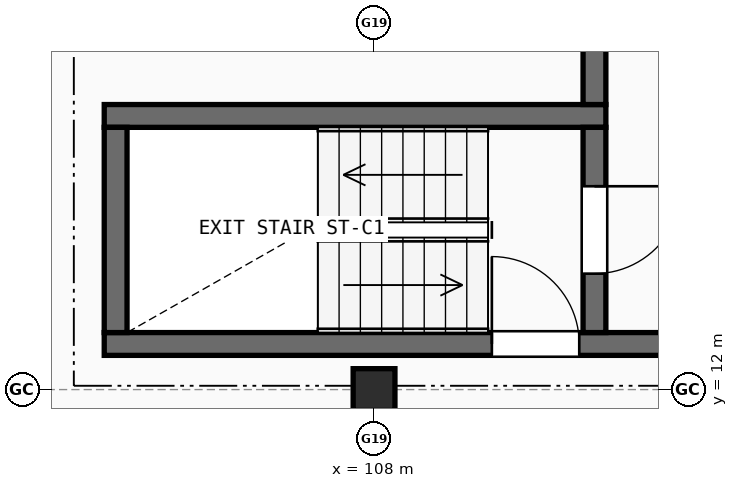
"""IFC4 building model, lengths in metres.
Left out: names, types, materials, properties, quantities, classifications, styles, units other than length and angle.
Written with IfcOpenShell. Run it as: python <this file> out.ifc"""

import sys

from ifc_helpers import new_model, si_unit, direction, frame, frame_2d, origin, origin_2d, place, context, subcontext, project, spatial, rectangle, extrude, element, fill, save


model = new_model("IFC4")
c1 = context("Model", 3, precision=1e-05, world=origin(), true_north=direction((0.0, 1.0)))
c2 = subcontext(c1, "Body", "Model", "MODEL_VIEW")
j1 = project(units=[si_unit("LENGTHUNIT", "METRE"), si_unit("PLANEANGLEUNIT", "RADIAN")], contexts=[c1])
p1 = place(None, origin())
s1 = spatial("IfcSite", under=j1, at=p1, CompositionType="ELEMENT")
p2 = place(p1, origin())
s2 = spatial("IfcBuilding", under=s1, at=p2, CompositionType="ELEMENT")
p3 = place(p2, frame((0.0, 0.0, 23.7)))
s3 = spatial("IfcBuildingStorey", under=s2, at=p3, CompositionType="ELEMENT", Elevation=23.7)
p4 = place(p3, frame((108.0, 12.0, 0.0), z_axis=(0.0, 0.0, 1.0), x_axis=(1.0, 0.0, 0.0)))
e1 = element("IfcColumn", 1, at=p4, inside=s3, PredefinedType="COLUMN", context=c2, shape_type="SweptSolid", body=[
    extrude(rectangle(XDim=0.55, YDim=0.55, at=origin_2d()), origin(), (0.0, 0.0, 1.0), 2.975),
])
p5 = place(p3, frame((104.45, 12.6, 0.0), z_axis=(0.0, 0.0, 1.0), x_axis=(1.0, 0.0, 0.0)))
e2 = element("IfcWall", 2, at=p5, inside=s3, PredefinedType="SHEAR", context=c2, shape_type="SweptSolid", body=[
    extrude(rectangle(XDim=11.35, YDim=0.3, at=frame_2d((5.675, 0.0))), origin(), (0.0, 0.0, 1.0), 2.975),
])
p6 = place(p5, frame((5.1, 0.0, 0.0)))
e3 = element("IfcOpeningElement", 3, at=p6, cuts=e2, PredefinedType="OPENING", context=c2, shape_type="SweptSolid", body=[
    extrude(rectangle(XDim=1.15, YDim=2.15, at=frame_2d((0.575, 1.075))), frame((0.0, 0.16, 0.0), z_axis=(0.0, -1.0, 0.0), x_axis=(1.0, 0.0, 0.0)), (0.0, 0.0, 1.0), 0.32),
])
p7 = place(p3, frame((111.05, 15.6, 0.0), z_axis=(0.0, 0.0, 1.0), x_axis=(-1.0, 0.0, 0.0)))
e4 = element("IfcWall", 4, at=p7, inside=s3, PredefinedType="SHEAR", context=c2, shape_type="SweptSolid", body=[
    extrude(rectangle(XDim=6.6, YDim=0.3, at=frame_2d((3.3, 0.0))), origin(), (0.0, 0.0, 1.0), 2.975),
])
p8 = place(p3, frame((104.6, 15.45, 0.0), z_axis=(0.0, 0.0, 1.0), x_axis=(0.0, -1.0, 0.0)))
e5 = element("IfcWall", 5, at=p8, inside=s3, PredefinedType="SHEAR", context=c2, shape_type="SweptSolid", body=[
    extrude(rectangle(XDim=2.7, YDim=0.3, at=frame_2d((1.35, 0.0))), origin(), (0.0, 0.0, 1.0), 2.975),
])
p9 = place(p3, frame((110.9, 12.75, 0.0), z_axis=(0.0, 0.0, 1.0), x_axis=(0.0, 1.0, 0.0)))
e6 = element("IfcWall", 6, at=p9, inside=s3, PredefinedType="SHEAR", context=c2, shape_type="SweptSolid", body=[
    extrude(rectangle(XDim=2.7, YDim=0.3, at=frame_2d((1.35, 0.0))), origin(), (0.0, 0.0, 1.0), 2.975),
])
p10 = place(p9, frame((0.775, 0.0, 0.0)))
e7 = element("IfcOpeningElement", 7, at=p10, cuts=e6, PredefinedType="OPENING", context=c2, shape_type="SweptSolid", body=[
    extrude(rectangle(XDim=1.15, YDim=2.15, at=frame_2d((0.575, 1.075))), frame((0.0, 0.16, 0.0), z_axis=(0.0, -1.0, 0.0), x_axis=(1.0, 0.0, 0.0)), (0.0, 0.0, 1.0), 0.32),
])
p11 = place(p3, frame((110.9, 15.75, 0.0), z_axis=(0.0, 0.0, 1.0), x_axis=(0.0, 1.0, 0.0)))
e8 = element("IfcWall", 8, at=p11, inside=s3, PredefinedType="SHEAR", context=c2, shape_type="SweptSolid", body=[
    extrude(rectangle(XDim=3.45, YDim=0.3, at=frame_2d((1.725, 0.0))), origin(), (0.0, 0.0, 1.0), 2.975),
])
p12 = place(p6, origin())
e9 = element("IfcDoor", 9, at=p12, inside=s3, OperationType="SINGLE_SWING_LEFT", PredefinedType="DOOR", context=c2, shape_type="SweptSolid", body=[
    extrude(rectangle(XDim=1.15, YDim=2.15, at=frame_2d((0.575, 1.075))), frame((0.0, 0.025, 0.0), z_axis=(0.0, -1.0, 0.0), x_axis=(1.0, 0.0, 0.0)), (0.0, 0.0, 1.0), 0.05),
])
fill(e3, e9)
p13 = place(p10, origin())
e10 = element("IfcDoor", 10, at=p13, inside=s3, OperationType="SINGLE_SWING_RIGHT", PredefinedType="DOOR", context=c2, shape_type="SweptSolid", body=[
    extrude(rectangle(XDim=1.15, YDim=2.15, at=frame_2d((0.575, 1.075))), frame((0.0, 0.025, 0.0), z_axis=(0.0, -1.0, 0.0), x_axis=(1.0, 0.0, 0.0)), (0.0, 0.0, 1.0), 0.05),
])
fill(e7, e10)
save(model, sys.argv[1])
